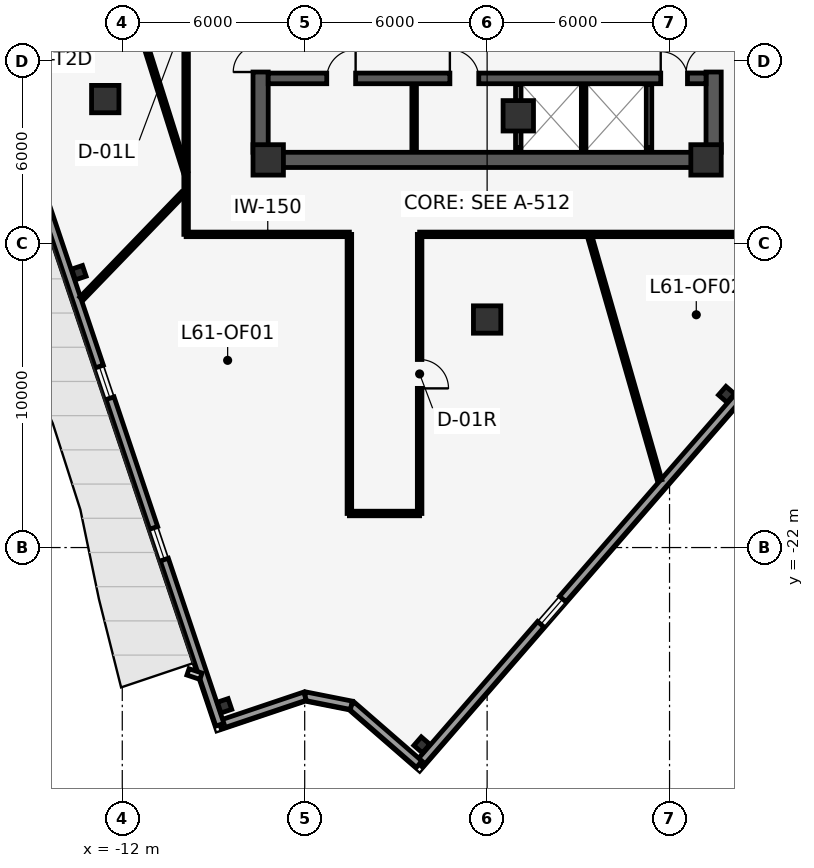
"""IFC4 building model, lengths in metres.
Left out: names, types, materials, properties, quantities, classifications, styles, units other than length and angle.
Written with IfcOpenShell. Run it as: python <this file> out.ifc"""

import sys

from ifc_helpers import new_model, si_unit, direction, frame, frame_2d, origin, origin_2d, place, context, subcontext, project, spatial, rectangle, i_section, extrude, element, fill, save


model = new_model("IFC4")
c1 = context("Model", 3, precision=1e-05, world=origin(), true_north=direction((0.0, 1.0)))
c2 = subcontext(c1, "Body", "Model", "MODEL_VIEW")
j1 = project(units=[si_unit("LENGTHUNIT", "METRE"), si_unit("PLANEANGLEUNIT", "RADIAN")], contexts=[c1])
p1 = place(None, origin())
s1 = spatial("IfcSite", under=j1, at=p1, CompositionType="ELEMENT")
p2 = place(p1, origin())
s2 = spatial("IfcBuilding", under=s1, at=p2, CompositionType="ELEMENT")
p3 = place(p2, frame((0.0, 0.0, 260.9)))
s3 = spatial("IfcBuildingStorey", under=s2, at=p3, CompositionType="ELEMENT", Elevation=260.9)
p4 = place(p3, frame((-7.45, -9.0, 0.0), z_axis=(0.0, 0.0, 1.0), x_axis=(0.0, 1.0, 0.0)))
e1 = element("IfcWall", 1, at=p4, inside=s3, PredefinedType="SHEAR", context=c2, shape_type="SweptSolid", body=[
    extrude(rectangle(XDim=9.1, YDim=0.5, at=frame_2d((4.55, 0.0))), origin(), (0.0, 0.0, 1.0), 4.35),
])
p5 = place(p4, frame((2.64, 0.0, 0.0)))
e2 = element("IfcOpeningElement", 2, at=p5, cuts=e1, PredefinedType="OPENING", context=c2, shape_type="SweptSolid", body=[
    extrude(rectangle(XDim=1.8, YDim=2.2, at=frame_2d((0.9, 1.1))), frame((0.0, 0.26, 0.0), z_axis=(0.0, -1.0, 0.0), x_axis=(1.0, 0.0, 0.0)), (0.0, 0.0, 1.0), 0.52),
])
p6 = place(p4, frame((7.55, 0.0, 0.0)))
e3 = element("IfcOpeningElement", 3, at=p6, cuts=e1, PredefinedType="OPENING", context=c2, shape_type="SweptSolid", body=[
    extrude(rectangle(XDim=1.2, YDim=2.15, at=frame_2d((0.6, 1.075))), frame((0.0, 0.26, 0.0), z_axis=(0.0, -1.0, 0.0), x_axis=(1.0, 0.0, 0.0)), (0.0, 0.0, 1.0), 0.52),
])
p7 = place(p3, frame((7.45, -9.0, 0.0), z_axis=(0.0, 0.0, 1.0), x_axis=(0.0, 1.0, 0.0)))
e4 = element("IfcWall", 4, at=p7, inside=s3, PredefinedType="SHEAR", context=c2, shape_type="SweptSolid", body=[
    extrude(rectangle(XDim=9.1, YDim=0.5, at=frame_2d((4.55, 0.0))), origin(), (0.0, 0.0, 1.0), 4.35),
])
p8 = place(p7, frame((2.64, 0.0, 0.0)))
e5 = element("IfcOpeningElement", 5, at=p8, cuts=e4, PredefinedType="OPENING", context=c2, shape_type="SweptSolid", body=[
    extrude(rectangle(XDim=1.8, YDim=2.2, at=frame_2d((0.9, 1.1))), frame((0.0, 0.26, 0.0), z_axis=(0.0, -1.0, 0.0), x_axis=(1.0, 0.0, 0.0)), (0.0, 0.0, 1.0), 0.52),
])
p9 = place(p7, frame((7.55, 0.0, 0.0)))
e6 = element("IfcOpeningElement", 6, at=p9, cuts=e4, PredefinedType="OPENING", context=c2, shape_type="SweptSolid", body=[
    extrude(rectangle(XDim=1.2, YDim=2.15, at=frame_2d((0.6, 1.075))), frame((0.0, 0.26, 0.0), z_axis=(0.0, -1.0, 0.0), x_axis=(1.0, 0.0, 0.0)), (0.0, 0.0, 1.0), 0.52),
])
p10 = place(p3, frame((-7.45, -9.25, 0.0), z_axis=(0.0, 0.0, 1.0), x_axis=(1.0, 0.0, 0.0)))
e7 = element("IfcWall", 7, at=p10, inside=s3, PredefinedType="SHEAR", context=c2, shape_type="SweptSolid", body=[
    extrude(rectangle(XDim=14.9, YDim=0.5, at=frame_2d((7.45, 0.0))), origin(), (0.0, 0.0, 1.0), 4.35),
])
p11 = place(p3, frame((-7.2, -6.57, 0.0), z_axis=(0.0, 0.0, 1.0), x_axis=(1.0, 0.0, 0.0)))
e8 = element("IfcWall", 8, at=p11, inside=s3, PredefinedType="SHEAR", context=c2, shape_type="SweptSolid", body=[
    extrude(rectangle(XDim=14.4, YDim=0.35, at=frame_2d((7.2, 0.0))), origin(), (0.0, 0.0, 1.0), 4.35),
])
p12 = place(p11, frame((1.925, 0.0, 0.0)))
e9 = element("IfcOpeningElement", 9, at=p12, cuts=e8, PredefinedType="OPENING", context=c2, shape_type="SweptSolid", body=[
    extrude(rectangle(XDim=0.95, YDim=2.15, at=frame_2d((0.475, 1.075))), frame((0.0, 0.185, 0.0), z_axis=(0.0, -1.0, 0.0), x_axis=(1.0, 0.0, 0.0)), (0.0, 0.0, 1.0), 0.37),
])
p13 = place(p11, frame((5.975, 0.0, 0.0)))
e10 = element("IfcOpeningElement", 10, at=p13, cuts=e8, PredefinedType="OPENING", context=c2, shape_type="SweptSolid", body=[
    extrude(rectangle(XDim=0.95, YDim=2.15, at=frame_2d((0.475, 1.075))), frame((0.0, 0.185, 0.0), z_axis=(0.0, -1.0, 0.0), x_axis=(1.0, 0.0, 0.0)), (0.0, 0.0, 1.0), 0.37),
])
p14 = place(p11, frame((12.91, 0.0, 0.0)))
e11 = element("IfcOpeningElement", 11, at=p14, cuts=e8, PredefinedType="OPENING", context=c2, shape_type="SweptSolid", body=[
    extrude(rectangle(XDim=0.88, YDim=2.15, at=frame_2d((0.44, 1.075))), frame((0.0, 0.185, 0.0), z_axis=(0.0, -1.0, 0.0), x_axis=(1.0, 0.0, 0.0)), (0.0, 0.0, 1.0), 0.37),
])
for number, where, z_axis, x_axis in (
    (12, (-7.2, -9.25, 0.0), (0.0, 0.0, 1.0), (1.0, 0.0, 0.0)),
    (13, (7.2, -9.25, 0.0), (0.0, 0.0, 1.0), (1.0, 0.0, 0.0)),
    (14, (1.025, -7.8, 0.0), (0.0, 0.0, 1.0), (1.0, 0.0, 0.0)),
):
    element("IfcColumn", number, at=place(p3, frame(where, z_axis=z_axis, x_axis=x_axis)), inside=s3, PredefinedType="COLUMN", context=c2, shape_type="SweptSolid", body=[
        extrude(rectangle(XDim=1.0, YDim=1.0, at=origin_2d()), origin(), (0.0, 0.0, 1.0), 4.6),
    ])
for number, where, z_axis, x_axis in (
    (15, (-12.56, -7.25, 0.0), (0.0, 0.0, 1.0), (1.0, 0.0, 0.0)),
    (16, (0.0, -14.5, 0.0), (0.0, 0.0, 1.0), (1.0, 0.0, 0.0)),
):
    element("IfcColumn", number, at=place(p3, frame(where, z_axis=z_axis, x_axis=x_axis)), inside=s3, PredefinedType="COLUMN", context=c2, shape_type="SweptSolid", body=[
        extrude(rectangle(XDim=0.9, YDim=0.9, at=origin_2d()), origin(), (0.0, 0.0, 1.0), 4.6),
    ])
for number, where, z_axis, x_axis in (
    (17, (-13.426, -12.959, 0.0), (0.0, 0.0, 1.0), (-0.319, 0.948, 0.0)),
    (18, (-8.636, -27.205, 0.0), (0.0, 0.0, 1.0), (-0.319, 0.948, 0.0)),
    (19, (-2.147, -28.49, 0.0), (0.0, 0.0, 1.0), (0.656, 0.755, 0.0)),
    (20, (7.874, -16.963, 0.0), (0.0, 0.0, 1.0), (0.656, 0.755, 0.0)),
):
    element("IfcColumn", number, at=place(p3, frame(where, z_axis=z_axis, x_axis=x_axis)), inside=s3, PredefinedType="COLUMN", context=c2, shape_type="SweptSolid", body=[
        extrude(i_section(OverallWidth=0.373, OverallDepth=0.373, WebThickness=0.016, FlangeThickness=0.026, at=origin_2d()), origin(), (0.0, 0.0, 1.0), 4.6),
    ])
p15 = place(p3, frame((28.531, 6.268, 0.0), z_axis=(0.0, 0.0, 1.0), x_axis=(-0.656055748756, -0.754712431674, 0.0)))
e21 = element("IfcWall", 21, at=p15, inside=s3, PredefinedType="STANDARD", context=c2, shape_type="SweptSolid", body=[
    extrude(rectangle(XDim=46.897, YDim=0.28, at=frame_2d((23.448, 0.0))), origin(), (0.0, 0.0, 1.0), 4.35),
])
p16 = place(p15, frame((6.099, 0.0, 0.85)))
e22 = element("IfcOpeningElement", 22, at=p16, cuts=e21, PredefinedType="OPENING", context=c2, shape_type="SweptSolid", body=[
    extrude(rectangle(XDim=1.1, YDim=2.15, at=frame_2d((0.55, 1.075))), frame((0.0, 0.15, 0.0), z_axis=(0.0, -1.0, 0.0), x_axis=(1.0, 0.0, 0.0)), (0.0, 0.0, 1.0), 0.3),
])
p17 = place(p15, frame((11.698, 0.0, 0.85)))
e23 = element("IfcOpeningElement", 23, at=p17, cuts=e21, PredefinedType="OPENING", context=c2, shape_type="SweptSolid", body=[
    extrude(rectangle(XDim=1.1, YDim=2.15, at=frame_2d((0.55, 1.075))), frame((0.0, 0.15, 0.0), z_axis=(0.0, -1.0, 0.0), x_axis=(1.0, 0.0, 0.0)), (0.0, 0.0, 1.0), 0.3),
])
p18 = place(p15, frame((39.698, 0.0, 0.85)))
e24 = element("IfcOpeningElement", 24, at=p18, cuts=e21, PredefinedType="OPENING", context=c2, shape_type="SweptSolid", body=[
    extrude(rectangle(XDim=1.1, YDim=2.15, at=frame_2d((0.55, 1.075))), frame((0.0, 0.15, 0.0), z_axis=(0.0, -1.0, 0.0), x_axis=(1.0, 0.0, 0.0)), (0.0, 0.0, 1.0), 0.3),
])
p19 = place(p3, frame((-2.236, -29.126, 0.0), z_axis=(0.0, 0.0, 1.0), x_axis=(-0.754753154029, 0.656008899698, 0.0)))
e25 = element("IfcWall", 25, at=p19, inside=s3, PredefinedType="STANDARD", context=c2, shape_type="SweptSolid", body=[
    extrude(rectangle(XDim=2.955, YDim=0.28, at=frame_2d((1.477, 0.0))), origin(), (0.0, 0.0, 1.0), 4.35),
])
p20 = place(p3, frame((-4.466, -27.188, 0.0), z_axis=(0.0, 0.0, 1.0), x_axis=(-0.980935552899, 0.194333324621, 0.0)))
e26 = element("IfcWall", 26, at=p20, inside=s3, PredefinedType="STANDARD", context=c2, shape_type="SweptSolid", body=[
    extrude(rectangle(XDim=1.554, YDim=0.28, at=frame_2d((0.777, 0.0))), origin(), (0.0, 0.0, 1.0), 4.35),
])
p21 = place(p3, frame((-5.99, -26.886, 0.0), z_axis=(0.0, 0.0, 1.0), x_axis=(-0.947795421507, -0.318879035013, 0.0)))
e27 = element("IfcWall", 27, at=p21, inside=s3, PredefinedType="STANDARD", context=c2, shape_type="SweptSolid", body=[
    extrude(rectangle(XDim=2.955, YDim=0.28, at=frame_2d((1.477, 0.0))), origin(), (0.0, 0.0, 1.0), 4.35),
])
p22 = place(p3, frame((-8.79, -27.828, 0.0), z_axis=(0.0, 0.0, 1.0), x_axis=(-0.318898365887, 0.947788917552, 0.0)))
e28 = element("IfcWall", 28, at=p22, inside=s3, PredefinedType="STANDARD", context=c2, shape_type="SweptSolid", body=[
    extrude(rectangle(XDim=46.163, YDim=0.28, at=frame_2d((23.081, 0.0))), origin(), (0.0, 0.0, 1.0), 4.35),
])
p23 = place(p22, frame((22.281, 0.0, 0.0)))
e29 = element("IfcOpeningElement", 29, at=p23, cuts=e28, PredefinedType="OPENING", context=c2, shape_type="SweptSolid", body=[
    extrude(rectangle(XDim=1.6, YDim=2.2, at=frame_2d((0.8, 1.1))), frame((0.0, 0.15, 0.0), z_axis=(0.0, -1.0, 0.0), x_axis=(1.0, 0.0, 0.0)), (0.0, 0.0, 1.0), 0.3),
])
p24 = place(p22, frame((5.731, 0.0, 0.85)))
e30 = element("IfcOpeningElement", 30, at=p24, cuts=e28, PredefinedType="OPENING", context=c2, shape_type="SweptSolid", body=[
    extrude(rectangle(XDim=1.1, YDim=2.15, at=frame_2d((0.55, 1.075))), frame((0.0, 0.15, 0.0), z_axis=(0.0, -1.0, 0.0), x_axis=(1.0, 0.0, 0.0)), (0.0, 0.0, 1.0), 0.3),
])
p25 = place(p22, frame((11.331, 0.0, 0.85)))
e31 = element("IfcOpeningElement", 31, at=p25, cuts=e28, PredefinedType="OPENING", context=c2, shape_type="SweptSolid", body=[
    extrude(rectangle(XDim=1.1, YDim=2.15, at=frame_2d((0.55, 1.075))), frame((0.0, 0.15, 0.0), z_axis=(0.0, -1.0, 0.0), x_axis=(1.0, 0.0, 0.0)), (0.0, 0.0, 1.0), 0.3),
])
p26 = place(p22, frame((33.731, 0.0, 0.85)))
e32 = element("IfcOpeningElement", 32, at=p26, cuts=e28, PredefinedType="OPENING", context=c2, shape_type="SweptSolid", body=[
    extrude(rectangle(XDim=1.1, YDim=2.15, at=frame_2d((0.55, 1.075))), frame((0.0, 0.15, 0.0), z_axis=(0.0, -1.0, 0.0), x_axis=(1.0, 0.0, 0.0)), (0.0, 0.0, 1.0), 0.3),
])
p27 = place(p22, frame((39.331, 0.0, 0.85)))
e33 = element("IfcOpeningElement", 33, at=p27, cuts=e28, PredefinedType="OPENING", context=c2, shape_type="SweptSolid", body=[
    extrude(rectangle(XDim=1.1, YDim=2.15, at=frame_2d((0.55, 1.075))), frame((0.0, 0.15, 0.0), z_axis=(0.0, -1.0, 0.0), x_axis=(1.0, 0.0, 0.0)), (0.0, 0.0, 1.0), 0.3),
])
p28 = place(p3, frame((1.025, -8.85, 0.0), z_axis=(0.0, 0.0, 1.0), x_axis=(0.0, 1.0, 0.0)))
e34 = element("IfcWall", 34, at=p28, inside=s3, PredefinedType="PARTITIONING", context=c2, shape_type="SweptSolid", body=[
    extrude(rectangle(XDim=2.08, YDim=0.18, at=frame_2d((1.04, 0.0))), origin(), (0.0, 0.0, 1.0), 3.398),
])
for number, where, z_axis, x_axis in (
    (35, (-2.4, -8.85, 0.0), (0.0, 0.0, 1.0), (0.0, 1.0, 0.0)),
    (36, (3.175, -8.85, 0.0), (0.0, 0.0, 1.0), (0.0, 1.0, 0.0)),
):
    element("IfcWall", number, at=place(p3, frame(where, z_axis=z_axis, x_axis=x_axis)), inside=s3, PredefinedType="PARTITIONING", context=c2, shape_type="SweptSolid", body=[
        extrude(rectangle(XDim=2.08, YDim=0.15, at=frame_2d((1.04, 0.0))), origin(), (0.0, 0.0, 1.0), 4.35),
    ])
p29 = place(p3, frame((5.325, -8.85, 0.0), z_axis=(0.0, 0.0, 1.0), x_axis=(0.0, 1.0, 0.0)))
e37 = element("IfcWall", 37, at=p29, inside=s3, PredefinedType="PARTITIONING", context=c2, shape_type="SweptSolid", body=[
    extrude(rectangle(XDim=2.08, YDim=0.18, at=frame_2d((1.04, 0.0))), origin(), (0.0, 0.0, 1.0), 4.35),
])
p30 = place(p3, frame((-4.53, -11.7, 0.0), z_axis=(0.0, 0.0, 1.0), x_axis=(-1.0, 0.0, 0.0)))
e38 = element("IfcWall", 38, at=p30, inside=s3, PredefinedType="PARTITIONING", context=c2, shape_type="SweptSolid", body=[
    extrude(rectangle(XDim=5.37, YDim=0.15, at=frame_2d((2.685, 0.0))), origin(), (0.0, 0.0, 1.0), 4.35),
])
p31 = place(p3, frame((-9.9, -11.7, 0.0), z_axis=(0.0, 0.0, 1.0), x_axis=(0.0, 1.0, 0.0)))
e39 = element("IfcWall", 39, at=p31, inside=s3, PredefinedType="PARTITIONING", context=c2, shape_type="SweptSolid", body=[
    extrude(rectangle(XDim=23.55, YDim=0.15, at=frame_2d((11.775, 0.0))), origin(), (0.0, 0.0, 1.0), 4.35),
])
p32 = place(p31, frame((6.736, 0.0, 0.0)))
e40 = element("IfcOpeningElement", 40, at=p32, cuts=e39, PredefinedType="OPENING", context=c2, shape_type="SweptSolid", body=[
    extrude(rectangle(XDim=0.95, YDim=2.15, at=frame_2d((0.475, 1.075))), frame((0.0, 0.085, 0.0), z_axis=(0.0, -1.0, 0.0), x_axis=(1.0, 0.0, 0.0)), (0.0, 0.0, 1.0), 0.17),
])
p33 = place(p31, frame((17.724, 0.0, 0.0)))
e41 = element("IfcOpeningElement", 41, at=p33, cuts=e39, PredefinedType="OPENING", context=c2, shape_type="SweptSolid", body=[
    extrude(rectangle(XDim=0.95, YDim=2.15, at=frame_2d((0.475, 1.075))), frame((0.0, 0.085, 0.0), z_axis=(0.0, -1.0, 0.0), x_axis=(1.0, 0.0, 0.0)), (0.0, 0.0, 1.0), 0.17),
])
p34 = place(p3, frame((9.103, -11.7, 0.0), z_axis=(0.0, 0.0, 1.0), x_axis=(-1.0, 0.0, 0.0)))
e42 = element("IfcWall", 42, at=p34, inside=s3, PredefinedType="PARTITIONING", context=c2, shape_type="SweptSolid", body=[
    extrude(rectangle(XDim=11.323, YDim=0.15, at=frame_2d((5.662, 0.0))), origin(), (0.0, 0.0, 1.0), 4.35),
])
p35 = place(p3, frame((-2.22, -11.7, 0.0), z_axis=(0.0, 0.0, 1.0), x_axis=(0.0, -1.0, 0.0)))
e43 = element("IfcWall", 43, at=p35, inside=s3, PredefinedType="PARTITIONING", context=c2, shape_type="SweptSolid", body=[
    extrude(rectangle(XDim=9.18, YDim=0.15, at=frame_2d((4.59, 0.0))), origin(), (0.0, 0.0, 1.0), 4.35),
])
p36 = place(p35, frame((4.115, 0.0, 0.0)))
e44 = element("IfcOpeningElement", 44, at=p36, cuts=e43, PredefinedType="OPENING", context=c2, shape_type="SweptSolid", body=[
    extrude(rectangle(XDim=0.95, YDim=2.15, at=frame_2d((0.475, 1.075))), frame((0.0, 0.085, 0.0), z_axis=(0.0, -1.0, 0.0), x_axis=(1.0, 0.0, 0.0)), (0.0, 0.0, 1.0), 0.17),
])
p37 = place(p3, frame((-2.22, -20.88, 0.0), z_axis=(0.0, 0.0, 1.0), x_axis=(-1.0, 0.0, 0.0)))
e45 = element("IfcWall", 45, at=p37, inside=s3, PredefinedType="PARTITIONING", context=c2, shape_type="SweptSolid", body=[
    extrude(rectangle(XDim=2.31, YDim=0.15, at=frame_2d((1.155, 0.0))), origin(), (0.0, 0.0, 1.0), 4.35),
])
p38 = place(p3, frame((-4.53, -20.88, 0.0), z_axis=(0.0, 0.0, 1.0), x_axis=(0.0, 1.0, 0.0)))
e46 = element("IfcWall", 46, at=p38, inside=s3, PredefinedType="PARTITIONING", context=c2, shape_type="SweptSolid", body=[
    extrude(rectangle(XDim=9.18, YDim=0.15, at=frame_2d((4.59, 0.0))), origin(), (0.0, 0.0, 1.0), 4.35),
])
p39 = place(p3, frame((-10.005, -10.361, 0.0), z_axis=(0.0, 0.0, 1.0), x_axis=(-0.694673426667, -0.719325260423, 0.0)))
e47 = element("IfcWall", 47, at=p39, inside=s3, PredefinedType="PARTITIONING", context=c2, shape_type="SweptSolid", body=[
    extrude(rectangle(XDim=4.803, YDim=0.15, at=frame_2d((2.402, 0.0))), origin(), (0.0, 0.0, 1.0), 4.35),
])
p40 = place(p3, frame((3.385, -11.805, 0.0), z_axis=(0.0, 0.0, 1.0), x_axis=(0.275648725589, -0.961258435636, 0.0)))
e48 = element("IfcWall", 48, at=p40, inside=s3, PredefinedType="PARTITIONING", context=c2, shape_type="SweptSolid", body=[
    extrude(rectangle(XDim=8.307, YDim=0.15, at=frame_2d((4.153, 0.0))), origin(), (0.0, 0.0, 1.0), 4.35),
])
p41 = place(p3, frame((-13.549, 1.879, 0.0), z_axis=(0.0, 0.0, 1.0), x_axis=(0.300333532513, -0.953834246213, 0.0)))
e49 = element("IfcWall", 49, at=p41, inside=s3, PredefinedType="PARTITIONING", context=c2, shape_type="SweptSolid", body=[
    extrude(rectangle(XDim=12.084, YDim=0.15, at=frame_2d((6.042, 0.0))), origin(), (0.0, 0.0, 1.0), 4.35),
])
p42 = place(p41, frame((5.567, 0.0, 0.0)))
e50 = element("IfcOpeningElement", 50, at=p42, cuts=e49, PredefinedType="OPENING", context=c2, shape_type="SweptSolid", body=[
    extrude(rectangle(XDim=0.95, YDim=2.15, at=frame_2d((0.475, 1.075))), frame((0.0, 0.085, 0.0), z_axis=(0.0, -1.0, 0.0), x_axis=(1.0, 0.0, 0.0)), (0.0, 0.0, 1.0), 0.17),
])
p43 = place(p18, origin())
e51 = element("IfcWindow", 51, at=p43, inside=s3, PartitioningType="SINGLE_PANEL", PredefinedType="WINDOW", context=c2, shape_type="SweptSolid", body=[
    extrude(rectangle(XDim=1.1, YDim=2.15, at=frame_2d((0.55, 1.075))), frame((0.0, 0.03, 0.0), z_axis=(0.0, -1.0, 0.0), x_axis=(1.0, 0.0, 0.0)), (0.0, 0.0, 1.0), 0.06),
])
fill(e24, e51)
p44 = place(p24, origin())
e52 = element("IfcWindow", 52, at=p44, inside=s3, PartitioningType="SINGLE_PANEL", PredefinedType="WINDOW", context=c2, shape_type="SweptSolid", body=[
    extrude(rectangle(XDim=1.1, YDim=2.15, at=frame_2d((0.55, 1.075))), frame((0.0, 0.03, 0.0), z_axis=(0.0, -1.0, 0.0), x_axis=(1.0, 0.0, 0.0)), (0.0, 0.0, 1.0), 0.06),
])
fill(e30, e52)
p45 = place(p25, origin())
e53 = element("IfcWindow", 53, at=p45, inside=s3, PartitioningType="SINGLE_PANEL", PredefinedType="WINDOW", context=c2, shape_type="SweptSolid", body=[
    extrude(rectangle(XDim=1.1, YDim=2.15, at=frame_2d((0.55, 1.075))), frame((0.0, 0.03, 0.0), z_axis=(0.0, -1.0, 0.0), x_axis=(1.0, 0.0, 0.0)), (0.0, 0.0, 1.0), 0.06),
])
fill(e31, e53)
p46 = place(p5, origin())
e54 = element("IfcDoor", 54, at=p46, inside=s3, OperationType="DOUBLE_DOOR_SINGLE_SWING", PredefinedType="DOOR", context=c2, shape_type="SweptSolid", body=[
    extrude(rectangle(XDim=1.8, YDim=2.2, at=frame_2d((0.9, 1.1))), frame((0.0, 0.025, 0.0), z_axis=(0.0, -1.0, 0.0), x_axis=(1.0, 0.0, 0.0)), (0.0, 0.0, 1.0), 0.05),
])
fill(e2, e54)
p47 = place(p8, origin())
e55 = element("IfcDoor", 55, at=p47, inside=s3, OperationType="DOUBLE_DOOR_SINGLE_SWING", PredefinedType="DOOR", context=c2, shape_type="SweptSolid", body=[
    extrude(rectangle(XDim=1.8, YDim=2.2, at=frame_2d((0.9, 1.1))), frame((0.0, 0.025, 0.0), z_axis=(0.0, -1.0, 0.0), x_axis=(1.0, 0.0, 0.0)), (0.0, 0.0, 1.0), 0.05),
])
fill(e5, e55)
p48 = place(p12, origin())
e56 = element("IfcDoor", 56, at=p48, inside=s3, OperationType="SINGLE_SWING_RIGHT", PredefinedType="DOOR", context=c2, shape_type="SweptSolid", body=[
    extrude(rectangle(XDim=0.95, YDim=2.15, at=frame_2d((0.475, 1.075))), frame((0.0, 0.025, 0.0), z_axis=(0.0, -1.0, 0.0), x_axis=(1.0, 0.0, 0.0)), (0.0, 0.0, 1.0), 0.05),
])
fill(e9, e56)
p49 = place(p13, origin())
e57 = element("IfcDoor", 57, at=p49, inside=s3, OperationType="SINGLE_SWING_LEFT", PredefinedType="DOOR", context=c2, shape_type="SweptSolid", body=[
    extrude(rectangle(XDim=0.95, YDim=2.15, at=frame_2d((0.475, 1.075))), frame((0.0, 0.025, 0.0), z_axis=(0.0, -1.0, 0.0), x_axis=(1.0, 0.0, 0.0)), (0.0, 0.0, 1.0), 0.05),
])
fill(e10, e57)
p50 = place(p14, origin())
e58 = element("IfcDoor", 58, at=p50, inside=s3, OperationType="SINGLE_SWING_LEFT", PredefinedType="DOOR", context=c2, shape_type="SweptSolid", body=[
    extrude(rectangle(XDim=0.88, YDim=2.15, at=frame_2d((0.44, 1.075))), frame((0.0, 0.025, 0.0), z_axis=(0.0, -1.0, 0.0), x_axis=(1.0, 0.0, 0.0)), (0.0, 0.0, 1.0), 0.05),
])
fill(e11, e58)
p51 = place(p36, origin())
e59 = element("IfcDoor", 59, at=p51, inside=s3, OperationType="SINGLE_SWING_RIGHT", PredefinedType="DOOR", context=c2, shape_type="SweptSolid", body=[
    extrude(rectangle(XDim=0.95, YDim=2.15, at=frame_2d((0.475, 1.075))), frame((0.0, 0.025, 0.0), z_axis=(0.0, -1.0, 0.0), x_axis=(1.0, 0.0, 0.0)), (0.0, 0.0, 1.0), 0.05),
])
fill(e44, e59)
save(model, sys.argv[1])
